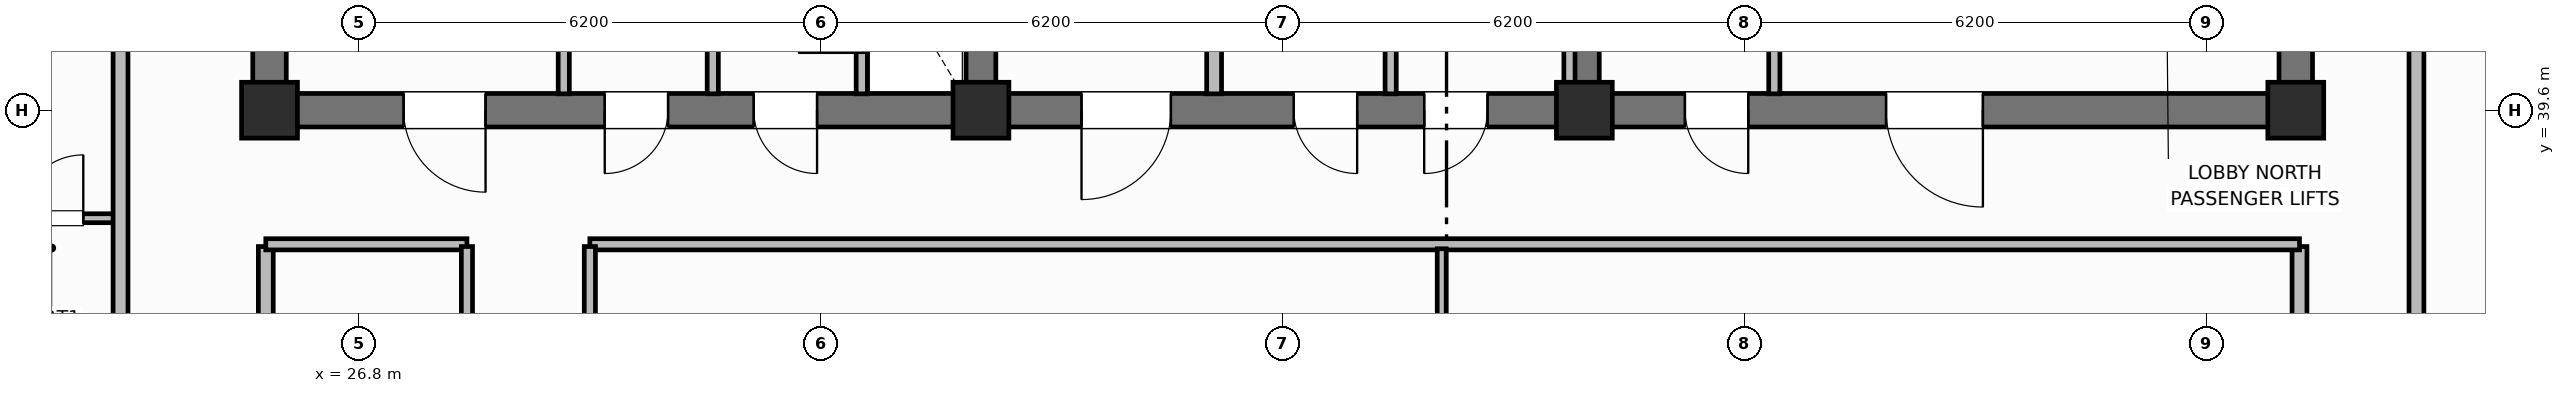
"""IFC4 building model, lengths in metres.
Left out: names, types, materials, properties, quantities, classifications, styles, units other than length and angle.
Written with IfcOpenShell. Run it as: python <this file> out.ifc"""

import sys

from ifc_helpers import new_model, si_unit, direction, frame, frame_2d, origin, origin_2d, place, context, subcontext, project, spatial, rectangle, extrude, element, fill, save


model = new_model("IFC4")
c1 = context("Model", 3, precision=1e-05, world=origin(), true_north=direction((0.0, 1.0)))
c2 = subcontext(c1, "Body", "Model", "MODEL_VIEW")
j1 = project(units=[si_unit("LENGTHUNIT", "METRE"), si_unit("PLANEANGLEUNIT", "RADIAN")], contexts=[c1])
p1 = place(None, origin())
s1 = spatial("IfcSite", under=j1, at=p1, CompositionType="ELEMENT")
p2 = place(p1, origin())
s2 = spatial("IfcBuilding", under=s1, at=p2, CompositionType="ELEMENT")
p3 = place(p2, frame((0.0, 0.0, 289.8)))
s3 = spatial("IfcBuildingStorey", under=s2, at=p3, CompositionType="ELEMENT", Elevation=289.8)
for number, where, z_axis, x_axis in (
    (1, (25.6, 39.825, 0.0), (0.0, 0.0, 1.0), (0.0, 1.0, 0.0)),
    (2, (52.8, 39.825, 0.0), (0.0, 0.0, 1.0), (0.0, 1.0, 0.0)),
):
    element("IfcWall", number, at=place(p3, frame(where, z_axis=z_axis, x_axis=x_axis)), inside=s3, PredefinedType="SHEAR", context=c2, shape_type="SweptSolid", body=[
        extrude(rectangle(XDim=5.75, YDim=0.45, at=frame_2d((2.875, 0.0))), origin(), (0.0, 0.0, 1.0), 3.7),
    ])
p4 = place(p3, frame((52.8, 39.6, 0.0), z_axis=(0.0, 0.0, 1.0), x_axis=(-1.0, 0.0, 0.0)))
e3 = element("IfcWall", 3, at=p4, inside=s3, PredefinedType="SHEAR", context=c2, shape_type="SweptSolid", body=[
    extrude(rectangle(XDim=27.2, YDim=0.45, at=frame_2d((13.6, 0.0))), origin(), (0.0, 0.0, 1.0), 3.7),
])
p5 = place(p4, frame((24.3, 0.0, 0.0)))
e4 = element("IfcOpeningElement", 4, at=p5, cuts=e3, PredefinedType="OPENING", context=c2, shape_type="SweptSolid", body=[
    extrude(rectangle(XDim=1.1, YDim=2.15, at=frame_2d((0.55, 1.075))), frame((0.0, 0.235, 0.0), z_axis=(0.0, -1.0, 0.0), x_axis=(1.0, 0.0, 0.0)), (0.0, 0.0, 1.0), 0.47),
])
p6 = place(p4, frame((21.85, 0.0, 0.0)))
e5 = element("IfcOpeningElement", 5, at=p6, cuts=e3, PredefinedType="OPENING", context=c2, shape_type="SweptSolid", body=[
    extrude(rectangle(XDim=0.85, YDim=2.1, at=frame_2d((0.425, 1.05))), frame((0.0, 0.235, 0.0), z_axis=(0.0, -1.0, 0.0), x_axis=(1.0, 0.0, 0.0)), (0.0, 0.0, 1.0), 0.47),
])
p7 = place(p4, frame((19.85, 0.0, 0.0)))
e6 = element("IfcOpeningElement", 6, at=p7, cuts=e3, PredefinedType="OPENING", context=c2, shape_type="SweptSolid", body=[
    extrude(rectangle(XDim=0.85, YDim=2.1, at=frame_2d((0.425, 1.05))), frame((0.0, 0.235, 0.0), z_axis=(0.0, -1.0, 0.0), x_axis=(1.0, 0.0, 0.0)), (0.0, 0.0, 1.0), 0.47),
])
p8 = place(p4, frame((15.1, 0.0, 0.0)))
e7 = element("IfcOpeningElement", 7, at=p8, cuts=e3, PredefinedType="OPENING", context=c2, shape_type="SweptSolid", body=[
    extrude(rectangle(XDim=1.2, YDim=2.15, at=frame_2d((0.6, 1.075))), frame((0.0, 0.235, 0.0), z_axis=(0.0, -1.0, 0.0), x_axis=(1.0, 0.0, 0.0)), (0.0, 0.0, 1.0), 0.47),
])
p9 = place(p4, frame((12.6, 0.0, 0.0)))
e8 = element("IfcOpeningElement", 8, at=p9, cuts=e3, PredefinedType="OPENING", context=c2, shape_type="SweptSolid", body=[
    extrude(rectangle(XDim=0.85, YDim=2.1, at=frame_2d((0.425, 1.05))), frame((0.0, 0.235, 0.0), z_axis=(0.0, -1.0, 0.0), x_axis=(1.0, 0.0, 0.0)), (0.0, 0.0, 1.0), 0.47),
])
p10 = place(p4, frame((10.85, 0.0, 0.0)))
e9 = element("IfcOpeningElement", 9, at=p10, cuts=e3, PredefinedType="OPENING", context=c2, shape_type="SweptSolid", body=[
    extrude(rectangle(XDim=0.85, YDim=2.1, at=frame_2d((0.425, 1.05))), frame((0.0, 0.235, 0.0), z_axis=(0.0, -1.0, 0.0), x_axis=(1.0, 0.0, 0.0)), (0.0, 0.0, 1.0), 0.47),
])
p11 = place(p4, frame((7.35, 0.0, 0.0)))
e10 = element("IfcOpeningElement", 10, at=p11, cuts=e3, PredefinedType="OPENING", context=c2, shape_type="SweptSolid", body=[
    extrude(rectangle(XDim=0.85, YDim=2.1, at=frame_2d((0.425, 1.05))), frame((0.0, 0.235, 0.0), z_axis=(0.0, -1.0, 0.0), x_axis=(1.0, 0.0, 0.0)), (0.0, 0.0, 1.0), 0.47),
])
p12 = place(p4, frame((4.2, 0.0, 0.0)))
e11 = element("IfcOpeningElement", 11, at=p12, cuts=e3, PredefinedType="OPENING", context=c2, shape_type="SweptSolid", body=[
    extrude(rectangle(XDim=1.3, YDim=2.2, at=frame_2d((0.65, 1.1))), frame((0.0, 0.235, 0.0), z_axis=(0.0, -1.0, 0.0), x_axis=(1.0, 0.0, 0.0)), (0.0, 0.0, 1.0), 0.47),
])
for number, where, z_axis, x_axis in (
    (12, (35.15, 39.825, 0.0), (0.0, 0.0, 1.0), (0.0, 1.0, 0.0)),
    (13, (43.25, 39.825, 0.0), (0.0, 0.0, 1.0), (0.0, 1.0, 0.0)),
):
    element("IfcWall", number, at=place(p3, frame(where, z_axis=z_axis, x_axis=x_axis)), inside=s3, PredefinedType="SHEAR", context=c2, shape_type="SweptSolid", body=[
        extrude(rectangle(XDim=5.75, YDim=0.4, at=frame_2d((2.875, 0.0))), origin(), (0.0, 0.0, 1.0), 3.7),
    ])
for number, where, z_axis, x_axis in (
    (14, (25.6, 39.6, 0.0), (0.0, 0.0, 1.0), (1.0, 0.0, 0.0)),
    (15, (35.15, 39.6, 0.0), (0.0, 0.0, 1.0), (1.0, 0.0, 0.0)),
    (16, (43.25, 39.6, 0.0), (0.0, 0.0, 1.0), (1.0, 0.0, 0.0)),
    (17, (52.8, 39.6, 0.0), (0.0, 0.0, 1.0), (1.0, 0.0, 0.0)),
):
    element("IfcColumn", number, at=place(p3, frame(where, z_axis=z_axis, x_axis=x_axis)), inside=s3, PredefinedType="COLUMN", context=c2, shape_type="SweptSolid", body=[
        extrude(rectangle(XDim=0.75, YDim=0.75, at=origin_2d()), origin(), (0.0, 0.0, 1.0), 3.7),
    ])
p13 = place(p3, frame((33.55, 39.82, 0.0), z_axis=(0.0, 0.0, 1.0), x_axis=(0.0, 1.0, 0.0)))
e18 = element("IfcWall", 18, at=p13, inside=s3, PredefinedType="PARTITIONING", context=c2, shape_type="SweptSolid", body=[
    extrude(rectangle(XDim=2.13, YDim=0.15, at=frame_2d((1.065, 0.0))), origin(), (0.0, 0.0, 1.0), 2.56),
])
p14 = place(p13, frame((0.55, 0.0, 0.0)))
e19 = element("IfcOpeningElement", 19, at=p14, cuts=e18, PredefinedType="OPENING", context=c2, shape_type="SweptSolid", body=[
    extrude(rectangle(XDim=0.85, YDim=2.05, at=frame_2d((0.425, 1.025))), frame((0.0, 0.085, 0.0), z_axis=(0.0, -1.0, 0.0), x_axis=(1.0, 0.0, 0.0)), (0.0, 0.0, 1.0), 0.17),
])
for number, where, z_axis, x_axis in (
    (20, (29.55, 39.82, 0.0), (0.0, 0.0, 1.0), (0.0, 1.0, 0.0)),
    (21, (31.55, 39.82, 0.0), (0.0, 0.0, 1.0), (0.0, 1.0, 0.0)),
):
    element("IfcWall", number, at=place(p3, frame(where, z_axis=z_axis, x_axis=x_axis)), inside=s3, PredefinedType="PARTITIONING", context=c2, shape_type="SweptSolid", body=[
        extrude(rectangle(XDim=2.13, YDim=0.15, at=frame_2d((1.065, 0.0))), origin(), (0.0, 0.0, 1.0), 2.56),
    ])
p15 = place(p3, frame((38.28, 39.82, 0.0), z_axis=(0.0, 0.0, 1.0), x_axis=(0.0, 1.0, 0.0)))
e22 = element("IfcWall", 22, at=p15, inside=s3, PredefinedType="PARTITIONING", context=c2, shape_type="SweptSolid", body=[
    extrude(rectangle(XDim=5.63, YDim=0.2, at=frame_2d((2.815, 0.0))), origin(), (0.0, 0.0, 1.0), 2.56),
])
for number, where, z_axis, x_axis in (
    (23, (43.05, 39.82, 0.0), (0.0, 0.0, 1.0), (0.0, 1.0, 0.0)),
    (24, (40.65, 39.82, 0.0), (0.0, 0.0, 1.0), (0.0, 1.0, 0.0)),
    (25, (45.8, 39.82, 0.0), (0.0, 0.0, 1.0), (0.0, 1.0, 0.0)),
):
    element("IfcWall", number, at=place(p3, frame(where, z_axis=z_axis, x_axis=x_axis)), inside=s3, PredefinedType="PARTITIONING", context=c2, shape_type="SweptSolid", body=[
        extrude(rectangle(XDim=5.63, YDim=0.15, at=frame_2d((2.815, 0.0))), origin(), (0.0, 0.0, 1.0), 2.56),
    ])
for number, where, z_axis, x_axis in (
    (26, (25.55, 18.63, 0.0), (0.0, 0.0, 1.0), (0.0, 1.0, 0.0)),
    (27, (52.85, 18.63, 0.0), (0.0, 0.0, 1.0), (0.0, 1.0, 0.0)),
):
    element("IfcWall", number, at=place(p3, frame(where, z_axis=z_axis, x_axis=x_axis)), inside=s3, PredefinedType="PARTITIONING", context=c2, shape_type="SweptSolid", body=[
        extrude(rectangle(XDim=19.14, YDim=0.2, at=frame_2d((9.57, 0.0))), origin(), (0.0, 0.0, 1.0), 2.56),
    ])
p16 = place(p3, frame((25.55, 37.8, 0.0), z_axis=(0.0, 0.0, 1.0), x_axis=(1.0, 0.0, 0.0)))
e28 = element("IfcWall", 28, at=p16, inside=s3, PredefinedType="PARTITIONING", context=c2, shape_type="SweptSolid", body=[
    extrude(rectangle(XDim=2.7, YDim=0.15, at=frame_2d((1.35, 0.0))), origin(), (0.0, 0.0, 1.0), 2.56),
])
p17 = place(p3, frame((29.9, 37.8, 0.0), z_axis=(0.0, 0.0, 1.0), x_axis=(1.0, 0.0, 0.0)))
e29 = element("IfcWall", 29, at=p17, inside=s3, PredefinedType="PARTITIONING", context=c2, shape_type="SweptSolid", body=[
    extrude(rectangle(XDim=22.95, YDim=0.15, at=frame_2d((11.475, 0.0))), origin(), (0.0, 0.0, 1.0), 2.56),
])
p18 = place(p3, frame((41.335, 25.56, 0.0), z_axis=(0.0, 0.0, 1.0), x_axis=(0.0, 1.0, 0.0)))
e30 = element("IfcWall", 30, at=p18, inside=s3, PredefinedType="PARTITIONING", context=c2, shape_type="SweptSolid", body=[
    extrude(rectangle(XDim=12.18, YDim=0.12, at=frame_2d((6.09, 0.0))), origin(), (0.0, 0.0, 1.0), 2.56),
])
p19 = place(p18, frame((2.0, 0.0, 0.0)))
e31 = element("IfcOpeningElement", 31, at=p19, cuts=e30, PredefinedType="OPENING", context=c2, shape_type="SweptSolid", body=[
    extrude(rectangle(XDim=0.9, YDim=2.1, at=frame_2d((0.45, 1.05))), frame((0.0, 0.07, 0.0), z_axis=(0.0, -1.0, 0.0), x_axis=(1.0, 0.0, 0.0)), (0.0, 0.0, 1.0), 0.14),
])
p20 = place(p3, frame((28.25, 18.63, 0.0), z_axis=(0.0, 0.0, 1.0), x_axis=(0.0, 1.0, 0.0)))
e32 = element("IfcWall", 32, at=p20, inside=s3, PredefinedType="PARTITIONING", context=c2, shape_type="SweptSolid", body=[
    extrude(rectangle(XDim=19.14, YDim=0.15, at=frame_2d((9.57, 0.0))), origin(), (0.0, 0.0, 1.0), 2.56),
])
p21 = place(p20, frame((3.0, 0.0, 0.0)))
e33 = element("IfcOpeningElement", 33, at=p21, cuts=e32, PredefinedType="OPENING", context=c2, shape_type="SweptSolid", body=[
    extrude(rectangle(XDim=0.9, YDim=2.1, at=frame_2d((0.45, 1.05))), frame((0.0, 0.085, 0.0), z_axis=(0.0, -1.0, 0.0), x_axis=(1.0, 0.0, 0.0)), (0.0, 0.0, 1.0), 0.17),
])
p22 = place(p20, frame((11.5, 0.0, 0.0)))
e34 = element("IfcOpeningElement", 34, at=p22, cuts=e32, PredefinedType="OPENING", context=c2, shape_type="SweptSolid", body=[
    extrude(rectangle(XDim=0.9, YDim=2.1, at=frame_2d((0.45, 1.05))), frame((0.0, 0.085, 0.0), z_axis=(0.0, -1.0, 0.0), x_axis=(1.0, 0.0, 0.0)), (0.0, 0.0, 1.0), 0.17),
])
p23 = place(p3, frame((29.9, 18.63, 0.0), z_axis=(0.0, 0.0, 1.0), x_axis=(0.0, 1.0, 0.0)))
e35 = element("IfcWall", 35, at=p23, inside=s3, PredefinedType="PARTITIONING", context=c2, shape_type="SweptSolid", body=[
    extrude(rectangle(XDim=19.14, YDim=0.15, at=frame_2d((9.57, 0.0))), origin(), (0.0, 0.0, 1.0), 2.56),
])
p24 = place(p23, frame((2.2, 0.0, 0.0)))
e36 = element("IfcOpeningElement", 36, at=p24, cuts=e35, PredefinedType="OPENING", context=c2, shape_type="SweptSolid", body=[
    extrude(rectangle(XDim=1.0, YDim=2.15, at=frame_2d((0.5, 1.075))), frame((0.0, 0.085, 0.0), z_axis=(0.0, -1.0, 0.0), x_axis=(1.0, 0.0, 0.0)), (0.0, 0.0, 1.0), 0.17),
])
p25 = place(p23, frame((8.89, 0.0, 0.0)))
e37 = element("IfcOpeningElement", 37, at=p25, cuts=e35, PredefinedType="OPENING", context=c2, shape_type="SweptSolid", body=[
    extrude(rectangle(XDim=1.0, YDim=2.15, at=frame_2d((0.5, 1.075))), frame((0.0, 0.085, 0.0), z_axis=(0.0, -1.0, 0.0), x_axis=(1.0, 0.0, 0.0)), (0.0, 0.0, 1.0), 0.17),
])
p26 = place(p3, frame((21.65, 38.15, 0.0), z_axis=(0.0, 0.0, 1.0), x_axis=(1.0, 0.0, 0.0)))
e38 = element("IfcWall", 38, at=p26, inside=s3, PredefinedType="PARTITIONING", context=c2, shape_type="SweptSolid", body=[
    extrude(rectangle(XDim=1.95, YDim=0.12, at=frame_2d((0.975, 0.0))), origin(), (0.0, 0.0, 1.0), 2.56),
])
p27 = place(p26, frame((0.6, 0.0, 0.0)))
e39 = element("IfcOpeningElement", 39, at=p27, cuts=e38, PredefinedType="OPENING", context=c2, shape_type="SweptSolid", body=[
    extrude(rectangle(XDim=0.85, YDim=2.1, at=frame_2d((0.425, 1.05))), frame((0.0, 0.07, 0.0), z_axis=(0.0, -1.0, 0.0), x_axis=(1.0, 0.0, 0.0)), (0.0, 0.0, 1.0), 0.14),
])
p28 = place(p3, frame((23.6, 9.95, 0.0), z_axis=(0.0, 0.0, 1.0), x_axis=(0.0, 1.0, 0.0)))
e40 = element("IfcWall", 40, at=p28, inside=s3, PredefinedType="PARTITIONING", context=c2, shape_type="SweptSolid", body=[
    extrude(rectangle(XDim=36.5, YDim=0.2, at=frame_2d((18.25, 0.0))), origin(), (0.0, 0.0, 1.0), 2.56),
])
p29 = place(p28, frame((3.25, 0.0, 0.0)))
e41 = element("IfcOpeningElement", 41, at=p29, cuts=e40, PredefinedType="OPENING", context=c2, shape_type="SweptSolid", body=[
    extrude(rectangle(XDim=1.0, YDim=2.15, at=frame_2d((0.5, 1.075))), frame((0.0, 0.11, 0.0), z_axis=(0.0, -1.0, 0.0), x_axis=(1.0, 0.0, 0.0)), (0.0, 0.0, 1.0), 0.22),
])
p30 = place(p28, frame((23.5, 0.0, 0.0)))
e42 = element("IfcOpeningElement", 42, at=p30, cuts=e40, PredefinedType="OPENING", context=c2, shape_type="SweptSolid", body=[
    extrude(rectangle(XDim=1.0, YDim=2.15, at=frame_2d((0.5, 1.075))), frame((0.0, 0.11, 0.0), z_axis=(0.0, -1.0, 0.0), x_axis=(1.0, 0.0, 0.0)), (0.0, 0.0, 1.0), 0.22),
])
p31 = place(p3, frame((54.42, 9.95, 0.0), z_axis=(0.0, 0.0, 1.0), x_axis=(0.0, 1.0, 0.0)))
e43 = element("IfcWall", 43, at=p31, inside=s3, PredefinedType="PARTITIONING", context=c2, shape_type="SweptSolid", body=[
    extrude(rectangle(XDim=36.5, YDim=0.2, at=frame_2d((18.25, 0.0))), origin(), (0.0, 0.0, 1.0), 2.56),
])
p32 = place(p31, frame((3.25, 0.0, 0.0)))
e44 = element("IfcOpeningElement", 44, at=p32, cuts=e43, PredefinedType="OPENING", context=c2, shape_type="SweptSolid", body=[
    extrude(rectangle(XDim=1.0, YDim=2.15, at=frame_2d((0.5, 1.075))), frame((0.0, 0.11, 0.0), z_axis=(0.0, -1.0, 0.0), x_axis=(1.0, 0.0, 0.0)), (0.0, 0.0, 1.0), 0.22),
])
p33 = place(p31, frame((14.25, 0.0, 0.0)))
e45 = element("IfcOpeningElement", 45, at=p33, cuts=e43, PredefinedType="OPENING", context=c2, shape_type="SweptSolid", body=[
    extrude(rectangle(XDim=1.0, YDim=2.15, at=frame_2d((0.5, 1.075))), frame((0.0, 0.11, 0.0), z_axis=(0.0, -1.0, 0.0), x_axis=(1.0, 0.0, 0.0)), (0.0, 0.0, 1.0), 0.22),
])
p34 = place(p14, origin())
e46 = element("IfcDoor", 46, at=p34, inside=s3, OperationType="SINGLE_SWING_LEFT", PredefinedType="TRAPDOOR", context=c2, shape_type="SweptSolid", body=[
    extrude(rectangle(XDim=0.85, YDim=2.05, at=frame_2d((0.425, 1.025))), frame((0.0, 0.025, 0.0), z_axis=(0.0, -1.0, 0.0), x_axis=(1.0, 0.0, 0.0)), (0.0, 0.0, 1.0), 0.05),
])
fill(e19, e46)
p35 = place(p27, origin())
e47 = element("IfcDoor", 47, at=p35, inside=s3, OperationType="SINGLE_SWING_RIGHT", PredefinedType="DOOR", context=c2, shape_type="SweptSolid", body=[
    extrude(rectangle(XDim=0.85, YDim=2.1, at=frame_2d((0.425, 1.05))), frame((0.0, 0.025, 0.0), z_axis=(0.0, -1.0, 0.0), x_axis=(1.0, 0.0, 0.0)), (0.0, 0.0, 1.0), 0.05),
])
fill(e39, e47)
p36 = place(p5, origin())
e48 = element("IfcDoor", 48, at=p36, inside=s3, OperationType="SINGLE_SWING_LEFT", PredefinedType="DOOR", context=c2, shape_type="SweptSolid", body=[
    extrude(rectangle(XDim=1.1, YDim=2.15, at=frame_2d((0.55, 1.075))), frame((0.0, 0.025, 0.0), z_axis=(0.0, -1.0, 0.0), x_axis=(1.0, 0.0, 0.0)), (0.0, 0.0, 1.0), 0.05),
])
fill(e4, e48)
p37 = place(p6, origin())
e49 = element("IfcDoor", 49, at=p37, inside=s3, OperationType="SINGLE_SWING_RIGHT", PredefinedType="DOOR", context=c2, shape_type="SweptSolid", body=[
    extrude(rectangle(XDim=0.85, YDim=2.1, at=frame_2d((0.425, 1.05))), frame((0.0, 0.025, 0.0), z_axis=(0.0, -1.0, 0.0), x_axis=(1.0, 0.0, 0.0)), (0.0, 0.0, 1.0), 0.05),
])
fill(e5, e49)
p38 = place(p7, origin())
e50 = element("IfcDoor", 50, at=p38, inside=s3, OperationType="SINGLE_SWING_LEFT", PredefinedType="DOOR", context=c2, shape_type="SweptSolid", body=[
    extrude(rectangle(XDim=0.85, YDim=2.1, at=frame_2d((0.425, 1.05))), frame((0.0, 0.025, 0.0), z_axis=(0.0, -1.0, 0.0), x_axis=(1.0, 0.0, 0.0)), (0.0, 0.0, 1.0), 0.05),
])
fill(e6, e50)
p39 = place(p8, origin())
e51 = element("IfcDoor", 51, at=p39, inside=s3, OperationType="SINGLE_SWING_RIGHT", PredefinedType="DOOR", context=c2, shape_type="SweptSolid", body=[
    extrude(rectangle(XDim=1.2, YDim=2.15, at=frame_2d((0.6, 1.075))), frame((0.0, 0.025, 0.0), z_axis=(0.0, -1.0, 0.0), x_axis=(1.0, 0.0, 0.0)), (0.0, 0.0, 1.0), 0.05),
])
fill(e7, e51)
p40 = place(p9, origin())
e52 = element("IfcDoor", 52, at=p40, inside=s3, OperationType="SINGLE_SWING_LEFT", PredefinedType="DOOR", context=c2, shape_type="SweptSolid", body=[
    extrude(rectangle(XDim=0.85, YDim=2.1, at=frame_2d((0.425, 1.05))), frame((0.0, 0.025, 0.0), z_axis=(0.0, -1.0, 0.0), x_axis=(1.0, 0.0, 0.0)), (0.0, 0.0, 1.0), 0.05),
])
fill(e8, e52)
p41 = place(p10, origin())
e53 = element("IfcDoor", 53, at=p41, inside=s3, OperationType="SINGLE_SWING_RIGHT", PredefinedType="DOOR", context=c2, shape_type="SweptSolid", body=[
    extrude(rectangle(XDim=0.85, YDim=2.1, at=frame_2d((0.425, 1.05))), frame((0.0, 0.025, 0.0), z_axis=(0.0, -1.0, 0.0), x_axis=(1.0, 0.0, 0.0)), (0.0, 0.0, 1.0), 0.05),
])
fill(e9, e53)
p42 = place(p11, origin())
e54 = element("IfcDoor", 54, at=p42, inside=s3, OperationType="SINGLE_SWING_LEFT", PredefinedType="DOOR", context=c2, shape_type="SweptSolid", body=[
    extrude(rectangle(XDim=0.85, YDim=2.1, at=frame_2d((0.425, 1.05))), frame((0.0, 0.025, 0.0), z_axis=(0.0, -1.0, 0.0), x_axis=(1.0, 0.0, 0.0)), (0.0, 0.0, 1.0), 0.05),
])
fill(e10, e54)
p43 = place(p12, origin())
e55 = element("IfcDoor", 55, at=p43, inside=s3, OperationType="SINGLE_SWING_LEFT", PredefinedType="DOOR", context=c2, shape_type="SweptSolid", body=[
    extrude(rectangle(XDim=1.3, YDim=2.2, at=frame_2d((0.65, 1.1))), frame((0.0, 0.025, 0.0), z_axis=(0.0, -1.0, 0.0), x_axis=(1.0, 0.0, 0.0)), (0.0, 0.0, 1.0), 0.05),
])
fill(e11, e55)
save(model, sys.argv[1])
